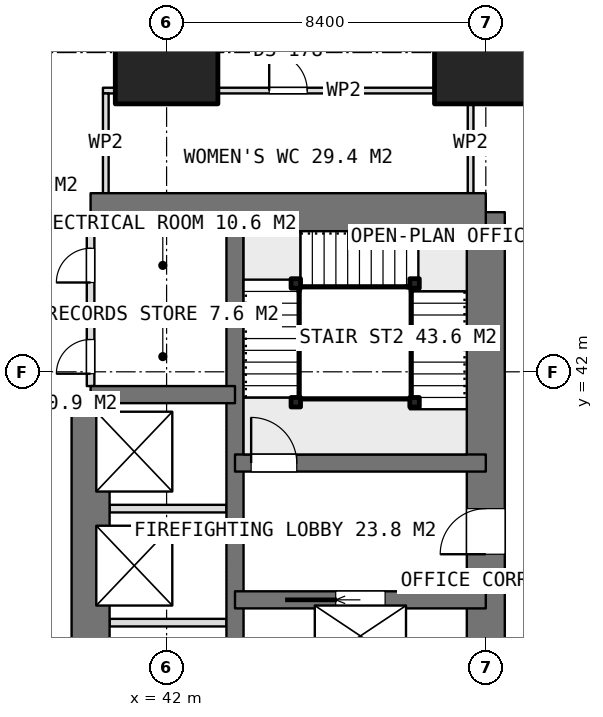
"""IFC4 building model, lengths in metres.
Left out: names, types, materials, properties, quantities, classifications, styles, units other than length and angle.
Written with IfcOpenShell. Run it as: python <this file> out.ifc"""

import sys

from ifc_helpers import new_model, si_unit, direction, frame, frame_2d, origin, origin_2d, place, context, subcontext, project, spatial, rectangle, extrude, element, fill, save


model = new_model("IFC4")
c1 = context("Model", 3, precision=1e-05, world=origin(), true_north=direction((0.0, 1.0)))
c2 = subcontext(c1, "Body", "Model", "MODEL_VIEW")
j1 = project(units=[si_unit("LENGTHUNIT", "METRE"), si_unit("PLANEANGLEUNIT", "RADIAN")], contexts=[c1])
p1 = place(None, origin())
s1 = spatial("IfcSite", under=j1, at=p1, CompositionType="ELEMENT")
p2 = place(p1, origin())
s2 = spatial("IfcBuilding", under=s1, at=p2, CompositionType="ELEMENT")
p3 = place(p2, frame((0.0, 0.0, 168.2)))
s3 = spatial("IfcBuildingStorey", under=s2, at=p3, CompositionType="ELEMENT", Elevation=168.2)
p4 = place(p3, frame((40.0, 46.2, 0.0), z_axis=(0.0, 0.0, 1.0), x_axis=(1.0, 0.0, 0.0)))
e1 = element("IfcWall", 1, at=p4, inside=s3, PredefinedType="SHEAR", context=c2, shape_type="SweptSolid", body=[
    extrude(rectangle(XDim=10.4, YDim=1.0, at=frame_2d((5.2, 0.0))), origin(), (0.0, 0.0, 1.0), 4.5),
])
p5 = place(p3, frame((50.4, 21.0, 0.0), z_axis=(0.0, 0.0, 1.0), x_axis=(0.0, 1.0, 0.0)))
e2 = element("IfcWall", 2, at=p5, inside=s3, PredefinedType="SHEAR", context=c2, shape_type="SweptSolid", body=[
    extrude(rectangle(XDim=25.2, YDim=1.0, at=frame_2d((12.6, 0.0))), origin(), (0.0, 0.0, 1.0), 4.5),
])
p6 = place(p5, frame((16.2, 0.0, 0.0)))
e3 = element("IfcOpeningElement", 3, at=p6, cuts=e2, PredefinedType="OPENING", context=c2, shape_type="SweptSolid", body=[
    extrude(rectangle(XDim=1.2, YDim=2.1, at=frame_2d((0.6, 1.05))), frame((0.0, 0.51, 0.0), z_axis=(0.0, -1.0, 0.0), x_axis=(1.0, 0.0, 0.0)), (0.0, 0.0, 1.0), 1.02),
])
p7 = place(p5, frame((10.05, 0.0, 0.0)))
e4 = element("IfcOpeningElement", 4, at=p7, cuts=e2, PredefinedType="OPENING", context=c2, shape_type="SweptSolid", body=[
    extrude(rectangle(XDim=0.9, YDim=2.1, at=frame_2d((0.45, 1.05))), frame((0.0, 0.51, 0.0), z_axis=(0.0, -1.0, 0.0), x_axis=(1.0, 0.0, 0.0)), (0.0, 0.0, 1.0), 1.02),
])
p8 = place(p5, frame((7.45, 0.0, 0.0)))
e5 = element("IfcOpeningElement", 5, at=p8, cuts=e2, PredefinedType="OPENING", context=c2, shape_type="SweptSolid", body=[
    extrude(rectangle(XDim=0.9, YDim=2.1, at=frame_2d((0.45, 1.05))), frame((0.0, 0.51, 0.0), z_axis=(0.0, -1.0, 0.0), x_axis=(1.0, 0.0, 0.0)), (0.0, 0.0, 1.0), 1.02),
])
p9 = place(p5, frame((0.7, 0.0, 0.0)))
e6 = element("IfcOpeningElement", 6, at=p9, cuts=e2, PredefinedType="OPENING", context=c2, shape_type="SweptSolid", body=[
    extrude(rectangle(XDim=1.2, YDim=2.1, at=frame_2d((0.6, 1.05))), frame((0.0, 0.51, 0.0), z_axis=(0.0, -1.0, 0.0), x_axis=(1.0, 0.0, 0.0)), (0.0, 0.0, 1.0), 1.02),
])
p10 = place(p3, frame((43.8, 21.0, 0.0), z_axis=(0.0, 0.0, 1.0), x_axis=(0.0, 1.0, 0.0)))
e7 = element("IfcWall", 7, at=p10, inside=s3, PredefinedType="SHEAR", context=c2, shape_type="SweptSolid", body=[
    extrude(rectangle(XDim=25.2, YDim=0.45, at=frame_2d((12.6, 0.0))), origin(), (0.0, 0.0, 1.0), 4.5),
])
p11 = place(p3, frame((40.0, 23.4, 0.0), z_axis=(0.0, 0.0, 1.0), x_axis=(0.0, 1.0, 0.0)))
e8 = element("IfcWall", 8, at=p11, inside=s3, PredefinedType="SHEAR", context=c2, shape_type="SweptSolid", body=[
    extrude(rectangle(XDim=18.0, YDim=1.0, at=frame_2d((9.0, 0.0))), origin(), (0.0, 0.0, 1.0), 4.5),
])
p12 = place(p11, frame((1.7, 0.0, 0.0)))
e9 = element("IfcOpeningElement", 9, at=p12, cuts=e8, PredefinedType="OPENING", context=c2, shape_type="SweptSolid", body=[
    extrude(rectangle(XDim=1.0, YDim=2.1, at=frame_2d((0.5, 1.05))), frame((0.0, 0.51, 0.0), z_axis=(0.0, -1.0, 0.0), x_axis=(1.0, 0.0, 0.0)), (0.0, 0.0, 1.0), 1.02),
])
p13 = place(p11, frame((4.75, 0.0, 0.0)))
e10 = element("IfcOpeningElement", 10, at=p13, cuts=e8, PredefinedType="OPENING", context=c2, shape_type="SweptSolid", body=[
    extrude(rectangle(XDim=0.9, YDim=2.1, at=frame_2d((0.45, 1.05))), frame((0.0, 0.51, 0.0), z_axis=(0.0, -1.0, 0.0), x_axis=(1.0, 0.0, 0.0)), (0.0, 0.0, 1.0), 1.02),
])
p14 = place(p11, frame((6.95, 0.0, 0.0)))
e11 = element("IfcOpeningElement", 11, at=p14, cuts=e8, PredefinedType="OPENING", context=c2, shape_type="SweptSolid", body=[
    extrude(rectangle(XDim=1.1, YDim=2.1, at=frame_2d((0.55, 1.05))), frame((0.0, 0.51, 0.0), z_axis=(0.0, -1.0, 0.0), x_axis=(1.0, 0.0, 0.0)), (0.0, 0.0, 1.0), 1.02),
])
p15 = place(p11, frame((9.95, 0.0, 0.0)))
e12 = element("IfcOpeningElement", 12, at=p15, cuts=e8, PredefinedType="OPENING", context=c2, shape_type="SweptSolid", body=[
    extrude(rectangle(XDim=1.1, YDim=2.1, at=frame_2d((0.55, 1.05))), frame((0.0, 0.51, 0.0), z_axis=(0.0, -1.0, 0.0), x_axis=(1.0, 0.0, 0.0)), (0.0, 0.0, 1.0), 1.02),
])
p16 = place(p3, frame((40.0, 41.4, 0.0), z_axis=(0.0, 0.0, 1.0), x_axis=(1.0, 0.0, 0.0)))
e13 = element("IfcWall", 13, at=p16, inside=s3, PredefinedType="SHEAR", context=c2, shape_type="SweptSolid", body=[
    extrude(rectangle(XDim=3.8, YDim=0.45, at=frame_2d((1.9, 0.0))), origin(), (0.0, 0.0, 1.0), 4.5),
])
p17 = place(p3, frame((43.8, 36.0, 0.0), z_axis=(0.0, 0.0, 1.0), x_axis=(1.0, 0.0, 0.0)))
e14 = element("IfcWall", 14, at=p17, inside=s3, PredefinedType="SHEAR", context=c2, shape_type="SweptSolid", body=[
    extrude(rectangle(XDim=6.6, YDim=0.45, at=frame_2d((3.3, 0.0))), origin(), (0.0, 0.0, 1.0), 4.5),
])
p18 = place(p17, frame((2.65, 0.0, 0.0)))
e15 = element("IfcOpeningElement", 15, at=p18, cuts=e14, PredefinedType="OPENING", context=c2, shape_type="SweptSolid", body=[
    extrude(rectangle(XDim=1.3, YDim=2.1, at=frame_2d((0.65, 1.05))), frame((0.0, 0.235, 0.0), z_axis=(0.0, -1.0, 0.0), x_axis=(1.0, 0.0, 0.0)), (0.0, 0.0, 1.0), 0.47),
])
p19 = place(p3, frame((43.8, 39.6, 0.0), z_axis=(0.0, 0.0, 1.0), x_axis=(1.0, 0.0, 0.0)))
e16 = element("IfcWall", 16, at=p19, inside=s3, PredefinedType="SHEAR", context=c2, shape_type="SweptSolid", body=[
    extrude(rectangle(XDim=6.6, YDim=0.45, at=frame_2d((3.3, 0.0))), origin(), (0.0, 0.0, 1.0), 4.5),
])
p20 = place(p19, frame((0.425, 0.0, 0.0)))
e17 = element("IfcOpeningElement", 17, at=p20, cuts=e16, PredefinedType="OPENING", context=c2, shape_type="SweptSolid", body=[
    extrude(rectangle(XDim=1.2, YDim=2.1, at=frame_2d((0.6, 1.05))), frame((0.0, 0.235, 0.0), z_axis=(0.0, -1.0, 0.0), x_axis=(1.0, 0.0, 0.0)), (0.0, 0.0, 1.0), 0.47),
])
for number, where, z_axis, x_axis in (
    (18, (42.0, 50.4, 0.0), (0.0, 0.0, 1.0), (1.0, 0.0, 0.0)),
    (19, (50.4, 50.4, 0.0), (0.0, 0.0, 1.0), (1.0, 0.0, 0.0)),
):
    element("IfcColumn", number, at=place(p3, frame(where, z_axis=z_axis, x_axis=x_axis)), inside=s3, PredefinedType="COLUMN", context=c2, shape_type="SweptSolid", body=[
        extrude(rectangle(XDim=2.7, YDim=2.7, at=origin_2d()), origin(), (0.0, 0.0, 1.0), 4.5),
    ])
for number, where, z_axis, x_axis in (
    (20, (40.5, 35.4, 0.0), (0.0, 0.0, 1.0), (1.0, 0.0, 0.0)),
    (21, (40.5, 38.4, 0.0), (0.0, 0.0, 1.0), (1.0, 0.0, 0.0)),
):
    element("IfcWall", number, at=place(p3, frame(where, z_axis=z_axis, x_axis=x_axis)), inside=s3, PredefinedType="PARTITIONING", context=c2, shape_type="SweptSolid", body=[
        extrude(rectangle(XDim=3.075, YDim=0.2, at=frame_2d((1.538, 0.0))), origin(), (0.0, 0.0, 1.0), 4.25),
    ])
p21 = place(p3, frame((40.0, 41.625, 0.0), z_axis=(0.0, 0.0, 1.0), x_axis=(0.0, 1.0, 0.0)))
e22 = element("IfcWall", 22, at=p21, inside=s3, PredefinedType="PARTITIONING", context=c2, shape_type="SweptSolid", body=[
    extrude(rectangle(XDim=4.075, YDim=0.2, at=frame_2d((2.038, 0.0))), origin(), (0.0, 0.0, 1.0), 4.25),
])
p22 = place(p21, frame((2.725, 0.0, 0.0)))
e23 = element("IfcOpeningElement", 23, at=p22, cuts=e22, PredefinedType="OPENING", context=c2, shape_type="SweptSolid", body=[
    extrude(rectangle(XDim=0.9, YDim=2.1, at=frame_2d((0.45, 1.05))), frame((0.0, 0.11, 0.0), z_axis=(0.0, -1.0, 0.0), x_axis=(1.0, 0.0, 0.0)), (0.0, 0.0, 1.0), 0.22),
])
p23 = place(p21, frame((0.325, 0.0, 0.0)))
e24 = element("IfcOpeningElement", 24, at=p23, cuts=e22, PredefinedType="OPENING", context=c2, shape_type="SweptSolid", body=[
    extrude(rectangle(XDim=0.9, YDim=2.1, at=frame_2d((0.45, 1.05))), frame((0.0, 0.11, 0.0), z_axis=(0.0, -1.0, 0.0), x_axis=(1.0, 0.0, 0.0)), (0.0, 0.0, 1.0), 0.22),
])
p24 = place(p3, frame((40.0, 43.4, 0.0), z_axis=(0.0, 0.0, 1.0), x_axis=(1.0, 0.0, 0.0)))
e25 = element("IfcWall", 25, at=p24, inside=s3, PredefinedType="PARTITIONING", context=c2, shape_type="SweptSolid", body=[
    extrude(rectangle(XDim=3.575, YDim=0.2, at=frame_2d((1.788, 0.0))), origin(), (0.0, 0.0, 1.0), 4.25),
])
p25 = place(p3, frame((40.325, 49.4, 0.0), z_axis=(0.0, 0.0, 1.0), x_axis=(1.0, 0.0, 0.0)))
e26 = element("IfcWall", 26, at=p25, inside=s3, PredefinedType="PARTITIONING", context=c2, shape_type="SweptSolid", body=[
    extrude(rectangle(XDim=9.75, YDim=0.15, at=frame_2d((4.875, 0.0))), origin(), (0.0, 0.0, 1.0), 4.25),
])
p26 = place(p25, frame((4.375, 0.0, 0.0)))
e27 = element("IfcOpeningElement", 27, at=p26, cuts=e26, PredefinedType="OPENING", context=c2, shape_type="SweptSolid", body=[
    extrude(rectangle(XDim=1.0, YDim=2.1, at=frame_2d((0.5, 1.05))), frame((0.0, 0.085, 0.0), z_axis=(0.0, -1.0, 0.0), x_axis=(1.0, 0.0, 0.0)), (0.0, 0.0, 1.0), 0.17),
])
for number, where, z_axis, x_axis in (
    (28, (40.4, 46.7, 0.0), (0.0, 0.0, 1.0), (0.0, 1.0, 0.0)),
    (29, (50.0, 46.7, 0.0), (0.0, 0.0, 1.0), (0.0, 1.0, 0.0)),
):
    element("IfcWall", number, at=place(p3, frame(where, z_axis=z_axis, x_axis=x_axis)), inside=s3, PredefinedType="PARTITIONING", context=c2, shape_type="SweptSolid", body=[
        extrude(rectangle(XDim=2.625, YDim=0.15, at=frame_2d((1.312, 0.0))), origin(), (0.0, 0.0, 1.0), 4.25),
    ])
for number, where, z_axis, x_axis in (
    (30, (45.4, 41.2, 0.0), (0.0, 0.0, 1.0), (1.0, 0.0, 0.0)),
    (31, (45.4, 44.325, 0.0), (0.0, 0.0, 1.0), (1.0, 0.0, 0.0)),
    (32, (48.525, 44.325, 0.0), (0.0, 0.0, 1.0), (1.0, 0.0, 0.0)),
    (33, (48.525, 41.2, 0.0), (0.0, 0.0, 1.0), (1.0, 0.0, 0.0)),
):
    element("IfcColumn", number, at=place(p3, frame(where, z_axis=z_axis, x_axis=x_axis)), inside=s3, PredefinedType="COLUMN", context=c2, shape_type="SweptSolid", body=[
        extrude(rectangle(XDim=0.25, YDim=0.25, at=origin_2d()), origin(), (0.0, 0.0, 1.0), 4.5),
    ])
p27 = place(p6, origin())
e34 = element("IfcDoor", 34, at=p27, inside=s3, OperationType="SINGLE_SWING_LEFT", PredefinedType="DOOR", context=c2, shape_type="SweptSolid", body=[
    extrude(rectangle(XDim=1.2, YDim=2.1, at=frame_2d((0.6, 1.05))), frame((0.0, 0.025, 0.0), z_axis=(0.0, -1.0, 0.0), x_axis=(1.0, 0.0, 0.0)), (0.0, 0.0, 1.0), 0.05),
])
fill(e3, e34)
p28 = place(p22, origin())
e35 = element("IfcDoor", 35, at=p28, inside=s3, OperationType="SINGLE_SWING_LEFT", PredefinedType="DOOR", context=c2, shape_type="SweptSolid", body=[
    extrude(rectangle(XDim=0.9, YDim=2.1, at=frame_2d((0.45, 1.05))), frame((0.0, 0.025, 0.0), z_axis=(0.0, -1.0, 0.0), x_axis=(1.0, 0.0, 0.0)), (0.0, 0.0, 1.0), 0.05),
])
fill(e23, e35)
p29 = place(p23, origin())
e36 = element("IfcDoor", 36, at=p29, inside=s3, OperationType="SINGLE_SWING_LEFT", PredefinedType="DOOR", context=c2, shape_type="SweptSolid", body=[
    extrude(rectangle(XDim=0.9, YDim=2.1, at=frame_2d((0.45, 1.05))), frame((0.0, 0.025, 0.0), z_axis=(0.0, -1.0, 0.0), x_axis=(1.0, 0.0, 0.0)), (0.0, 0.0, 1.0), 0.05),
])
fill(e24, e36)
p30 = place(p18, origin())
e37 = element("IfcDoor", 37, at=p30, inside=s3, OperationType="SLIDING_TO_LEFT", PredefinedType="USERDEFINED", context=c2, shape_type="SweptSolid", body=[
    extrude(rectangle(XDim=1.3, YDim=2.1, at=frame_2d((0.65, 1.05))), frame((0.0, 0.025, 0.0), z_axis=(0.0, -1.0, 0.0), x_axis=(1.0, 0.0, 0.0)), (0.0, 0.0, 1.0), 0.05),
])
fill(e15, e37)
p31 = place(p26, origin())
e38 = element("IfcDoor", 38, at=p31, inside=s3, OperationType="SINGLE_SWING_LEFT", PredefinedType="DOOR", context=c2, shape_type="SweptSolid", body=[
    extrude(rectangle(XDim=1.0, YDim=2.1, at=frame_2d((0.5, 1.05))), frame((0.0, 0.025, 0.0), z_axis=(0.0, -1.0, 0.0), x_axis=(1.0, 0.0, 0.0)), (0.0, 0.0, 1.0), 0.05),
])
fill(e27, e38)
p32 = place(p20, origin())
e39 = element("IfcDoor", 39, at=p32, inside=s3, OperationType="SINGLE_SWING_RIGHT", PredefinedType="DOOR", context=c2, shape_type="SweptSolid", body=[
    extrude(rectangle(XDim=1.2, YDim=2.1, at=frame_2d((0.6, 1.05))), frame((0.0, 0.025, 0.0), z_axis=(0.0, -1.0, 0.0), x_axis=(1.0, 0.0, 0.0)), (0.0, 0.0, 1.0), 0.05),
])
fill(e17, e39)
save(model, sys.argv[1])
